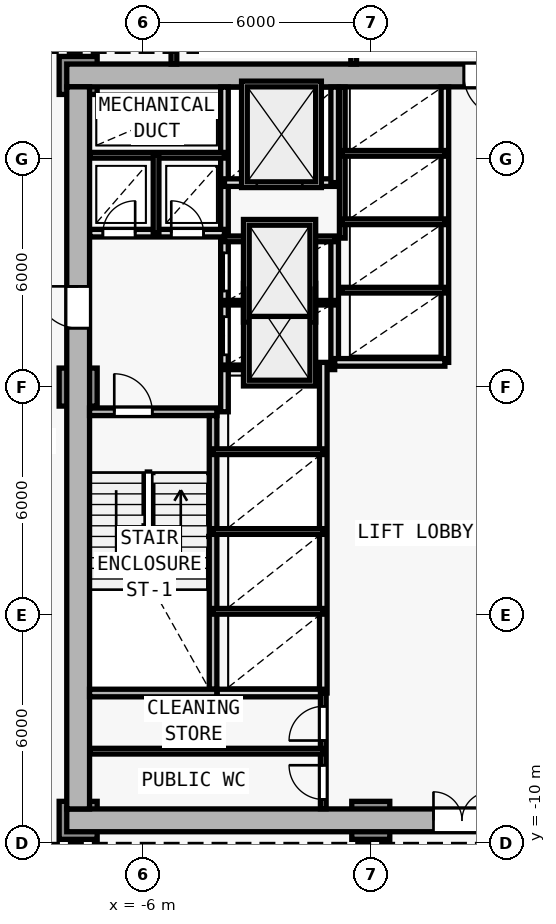
"""IFC4 building model, lengths in metres.
Left out: names, types, materials, properties, quantities, classifications, styles, units other than length and angle.
Written with IfcOpenShell. Run it as: python <this file> out.ifc"""

import sys

from ifc_helpers import new_model, si_unit, direction, frame, frame_2d, origin, origin_2d, place, context, subcontext, project, spatial, rectangle, extrude, element, fill, save


model = new_model("IFC4")
c1 = context("Model", 3, precision=1e-05, world=origin(), true_north=direction((0.0, 1.0)))
c2 = subcontext(c1, "Body", "Model", "MODEL_VIEW")
j1 = project(units=[si_unit("LENGTHUNIT", "METRE"), si_unit("PLANEANGLEUNIT", "RADIAN")], contexts=[c1])
p1 = place(None, origin())
s1 = spatial("IfcSite", under=j1, at=p1, CompositionType="ELEMENT")
p2 = place(p1, origin())
s2 = spatial("IfcBuilding", under=s1, at=p2, CompositionType="ELEMENT")
p3 = place(p2, frame((0.0, 0.0, 9.2)))
s3 = spatial("IfcBuildingStorey", under=s2, at=p3, CompositionType="ELEMENT", Elevation=9.2)
for number, where, z_axis, x_axis in (
    (1, (-7.7, -9.4, 0.0), (0.0, 0.0, 1.0), (1.0, 0.0, 0.0)),
    (2, (-7.7, 10.2, 0.0), (0.0, 0.0, 1.0), (1.0, 0.0, 0.0)),
    (3, (0.0, -9.4, 0.0), (0.0, 0.0, 1.0), (1.0, 0.0, 0.0)),
    (4, (-7.7, 2.0, 0.0), (0.0, 0.0, 1.0), (1.0, 0.0, 0.0)),
):
    element("IfcColumn", number, at=place(p3, frame(where, z_axis=z_axis, x_axis=x_axis)), inside=s3, PredefinedType="COLUMN", context=c2, shape_type="SweptSolid", body=[
        extrude(rectangle(XDim=1.0, YDim=1.0, at=origin_2d()), origin(), (0.0, 0.0, 1.0), 4.2),
    ])
p4 = place(p3, frame((-8.0, -9.4, 0.0), z_axis=(0.0, 0.0, 1.0), x_axis=(1.0, 0.0, 0.0)))
e5 = element("IfcWall", 5, at=p4, inside=s3, PredefinedType="SHEAR", context=c2, shape_type="SweptSolid", body=[
    extrude(rectangle(XDim=16.0, YDim=0.6, at=frame_2d((8.0, 0.0))), origin(), (0.0, 0.0, 1.0), 3.92),
])
p5 = place(p4, frame((9.65, 0.0, 0.0)))
e6 = element("IfcOpeningElement", 6, at=p5, cuts=e5, PredefinedType="OPENING", context=c2, shape_type="SweptSolid", body=[
    extrude(rectangle(XDim=1.5, YDim=2.2, at=frame_2d((0.75, 1.1))), frame((0.0, 0.31, 0.0), z_axis=(0.0, -1.0, 0.0), x_axis=(1.0, 0.0, 0.0)), (0.0, 0.0, 1.0), 0.62),
])
p6 = place(p3, frame((8.0, 10.2, 0.0), z_axis=(0.0, 0.0, 1.0), x_axis=(-1.0, 0.0, 0.0)))
e7 = element("IfcWall", 7, at=p6, inside=s3, PredefinedType="SHEAR", context=c2, shape_type="SweptSolid", body=[
    extrude(rectangle(XDim=16.0, YDim=0.6, at=frame_2d((8.0, 0.0))), origin(), (0.0, 0.0, 1.0), 3.92),
])
p7 = place(p6, frame((4.45, 0.0, 0.0)))
e8 = element("IfcOpeningElement", 8, at=p7, cuts=e7, PredefinedType="OPENING", context=c2, shape_type="SweptSolid", body=[
    extrude(rectangle(XDim=1.1, YDim=2.15, at=frame_2d((0.55, 1.075))), frame((0.0, 0.31, 0.0), z_axis=(0.0, -1.0, 0.0), x_axis=(1.0, 0.0, 0.0)), (0.0, 0.0, 1.0), 0.62),
])
p8 = place(p3, frame((-7.7, -9.1, 0.0), z_axis=(0.0, 0.0, 1.0), x_axis=(0.0, 1.0, 0.0)))
e9 = element("IfcWall", 9, at=p8, inside=s3, PredefinedType="SHEAR", context=c2, shape_type="SweptSolid", body=[
    extrude(rectangle(XDim=19.0, YDim=0.6, at=frame_2d((9.5, 0.0))), origin(), (0.0, 0.0, 1.0), 3.92),
])
p9 = place(p8, frame((12.65, 0.0, 0.0)))
e10 = element("IfcOpeningElement", 10, at=p9, cuts=e9, PredefinedType="OPENING", context=c2, shape_type="SweptSolid", body=[
    extrude(rectangle(XDim=1.1, YDim=2.15, at=frame_2d((0.55, 1.075))), frame((0.0, 0.31, 0.0), z_axis=(0.0, -1.0, 0.0), x_axis=(1.0, 0.0, 0.0)), (0.0, 0.0, 1.0), 0.62),
])
p10 = place(p3, frame((-7.4, 1.35, 0.0), z_axis=(0.0, 0.0, 1.0), x_axis=(1.0, 0.0, 0.0)))
e11 = element("IfcWall", 11, at=p10, inside=s3, PredefinedType="SOLIDWALL", context=c2, shape_type="SweptSolid", body=[
    extrude(rectangle(XDim=3.35, YDim=0.2, at=frame_2d((1.675, 0.0))), origin(), (0.0, 0.0, 1.0), 3.92),
])
p11 = place(p10, frame((0.65, 0.0, 0.0)))
e12 = element("IfcOpeningElement", 12, at=p11, cuts=e11, PredefinedType="OPENING", context=c2, shape_type="SweptSolid", body=[
    extrude(rectangle(XDim=1.0, YDim=2.15, at=frame_2d((0.5, 1.075))), frame((0.0, 0.11, 0.0), z_axis=(0.0, -1.0, 0.0), x_axis=(1.0, 0.0, 0.0)), (0.0, 0.0, 1.0), 0.22),
])
p12 = place(p3, frame((-4.15, -5.95, 0.0), z_axis=(0.0, 0.0, 1.0), x_axis=(0.0, 1.0, 0.0)))
e13 = element("IfcWall", 13, at=p12, inside=s3, PredefinedType="SOLIDWALL", context=c2, shape_type="SweptSolid", body=[
    extrude(rectangle(XDim=7.2, YDim=0.2, at=frame_2d((3.6, 0.0))), origin(), (0.0, 0.0, 1.0), 3.92),
])
p13 = place(p3, frame((-3.85, 1.35, 0.0), z_axis=(0.0, 0.0, 1.0), x_axis=(0.0, 1.0, 0.0)))
e14 = element("IfcWall", 14, at=p13, inside=s3, PredefinedType="SOLIDWALL", context=c2, shape_type="SweptSolid", body=[
    extrude(rectangle(XDim=8.545, YDim=0.2, at=frame_2d((4.272, 0.0))), origin(), (0.0, 0.0, 1.0), 3.92),
])
p14 = place(p13, frame((1.5, 0.0, 0.0)))
e15 = element("IfcOpeningElement", 15, at=p14, cuts=e14, PredefinedType="OPENING", context=c2, shape_type="SweptSolid", body=[
    extrude(rectangle(XDim=1.0, YDim=2.15, at=frame_2d((0.5, 1.075))), frame((0.0, 0.11, 0.0), z_axis=(0.0, -1.0, 0.0), x_axis=(1.0, 0.0, 0.0)), (0.0, 0.0, 1.0), 0.22),
])
p15 = place(p13, frame((3.18, 0.0, 0.0)))
e16 = element("IfcOpeningElement", 16, at=p15, cuts=e14, PredefinedType="OPENING", context=c2, shape_type="SweptSolid", body=[
    extrude(rectangle(XDim=1.0, YDim=2.15, at=frame_2d((0.5, 1.075))), frame((0.0, 0.11, 0.0), z_axis=(0.0, -1.0, 0.0), x_axis=(1.0, 0.0, 0.0)), (0.0, 0.0, 1.0), 0.22),
])
p16 = place(p3, frame((-7.395, 6.05, 0.0), z_axis=(0.0, 0.0, 1.0), x_axis=(1.0, 0.0, 0.0)))
e17 = element("IfcWall", 17, at=p16, inside=s3, PredefinedType="SOLIDWALL", context=c2, shape_type="SweptSolid", body=[
    extrude(rectangle(XDim=3.545, YDim=0.2, at=frame_2d((1.772, 0.0))), origin(), (0.0, 0.0, 1.0), 3.92),
])
p17 = place(p16, frame((0.345, 0.0, 0.0)))
e18 = element("IfcOpeningElement", 18, at=p17, cuts=e17, PredefinedType="OPENING", context=c2, shape_type="SweptSolid", body=[
    extrude(rectangle(XDim=0.85, YDim=2.1, at=frame_2d((0.425, 1.05))), frame((0.0, 0.11, 0.0), z_axis=(0.0, -1.0, 0.0), x_axis=(1.0, 0.0, 0.0)), (0.0, 0.0, 1.0), 0.22),
])
p18 = place(p16, frame((2.145, 0.0, 0.0)))
e19 = element("IfcOpeningElement", 19, at=p18, cuts=e17, PredefinedType="OPENING", context=c2, shape_type="SweptSolid", body=[
    extrude(rectangle(XDim=0.85, YDim=2.1, at=frame_2d((0.425, 1.05))), frame((0.0, 0.11, 0.0), z_axis=(0.0, -1.0, 0.0), x_axis=(1.0, 0.0, 0.0)), (0.0, 0.0, 1.0), 0.22),
])
p19 = place(p3, frame((-7.395, 8.1, 0.0), z_axis=(0.0, 0.0, 1.0), x_axis=(1.0, 0.0, 0.0)))
e20 = element("IfcWall", 20, at=p19, inside=s3, PredefinedType="PARTITIONING", context=c2, shape_type="SweptSolid", body=[
    extrude(rectangle(XDim=3.545, YDim=0.15, at=frame_2d((1.772, 0.0))), origin(), (0.0, 0.0, 1.0), 3.92),
])
p20 = place(p3, frame((-5.65, 6.05, 0.0), z_axis=(0.0, 0.0, 1.0), x_axis=(0.0, 1.0, 0.0)))
e21 = element("IfcWall", 21, at=p20, inside=s3, PredefinedType="PARTITIONING", context=c2, shape_type="SweptSolid", body=[
    extrude(rectangle(XDim=2.05, YDim=0.15, at=frame_2d((1.025, 0.0))), origin(), (0.0, 0.0, 1.0), 3.92),
])
p21 = place(p3, frame((-0.95, 2.65, 0.0), z_axis=(0.0, 0.0, 1.0), x_axis=(0.0, 1.0, 0.0)))
e22 = element("IfcWall", 22, at=p21, inside=s3, PredefinedType="SOLIDWALL", context=c2, shape_type="SweptSolid", body=[
    extrude(rectangle(XDim=3.27, YDim=0.2, at=frame_2d((1.635, 0.0))), origin(), (0.0, 0.0, 1.0), 3.92),
])
for number, where, z_axis, x_axis in (
    (23, (-3.85, 2.52, 0.0), (0.0, 0.0, 1.0), (1.0, 0.0, 0.0)),
    (24, (-3.85, 4.22, 0.0), (0.0, 0.0, 1.0), (1.0, 0.0, 0.0)),
):
    element("IfcWall", number, at=place(p3, frame(where, z_axis=z_axis, x_axis=x_axis)), inside=s3, PredefinedType="PARTITIONING", context=c2, shape_type="SweptSolid", body=[
        extrude(rectangle(XDim=2.9, YDim=0.12, at=frame_2d((1.45, 0.0))), origin(), (0.0, 0.0, 1.0), 3.92),
    ])
p22 = place(p3, frame((-3.85, 5.9, 0.0), z_axis=(0.0, 0.0, 1.0), x_axis=(1.0, 0.0, 0.0)))
e25 = element("IfcWall", 25, at=p22, inside=s3, PredefinedType="PARTITIONING", context=c2, shape_type="SweptSolid", body=[
    extrude(rectangle(XDim=2.9, YDim=0.15, at=frame_2d((1.45, 0.0))), origin(), (0.0, 0.0, 1.0), 3.92),
])
p23 = place(p3, frame((-3.85, 7.38, 0.0), z_axis=(0.0, 0.0, 1.0), x_axis=(1.0, 0.0, 0.0)))
e26 = element("IfcWall", 26, at=p23, inside=s3, PredefinedType="SOLIDWALL", context=c2, shape_type="SweptSolid", body=[
    extrude(rectangle(XDim=2.9, YDim=0.2, at=frame_2d((1.45, 0.0))), origin(), (0.0, 0.0, 1.0), 3.92),
])
p24 = place(p23, frame((0.85, 0.0, 0.0)))
e27 = element("IfcOpeningElement", 27, at=p24, cuts=e26, PredefinedType="OPENING", context=c2, shape_type="SweptSolid", body=[
    extrude(rectangle(XDim=1.2, YDim=2.2, at=frame_2d((0.6, 1.1))), frame((0.0, 0.11, 0.0), z_axis=(0.0, -1.0, 0.0), x_axis=(1.0, 0.0, 0.0)), (0.0, 0.0, 1.0), 0.22),
])
p25 = place(p3, frame((-0.95, 7.38, 0.0), z_axis=(0.0, 0.0, 1.0), x_axis=(0.0, 1.0, 0.0)))
e28 = element("IfcWall", 28, at=p25, inside=s3, PredefinedType="SOLIDWALL", context=c2, shape_type="SweptSolid", body=[
    extrude(rectangle(XDim=2.515, YDim=0.2, at=frame_2d((1.258, 0.0))), origin(), (0.0, 0.0, 1.0), 3.92),
])
p26 = place(p3, frame((-1.25, -6.05, 0.0), z_axis=(0.0, 0.0, 1.0), x_axis=(0.0, 1.0, 0.0)))
e29 = element("IfcWall", 29, at=p26, inside=s3, PredefinedType="SOLIDWALL", context=c2, shape_type="SweptSolid", body=[
    extrude(rectangle(XDim=8.7, YDim=0.2, at=frame_2d((4.35, 0.0))), origin(), (0.0, 0.0, 1.0), 3.92),
])
for number, where, z_axis, x_axis in (
    (30, (-4.15, -3.9, 0.0), (0.0, 0.0, 1.0), (1.0, 0.0, 0.0)),
    (31, (-4.15, -1.8, 0.0), (0.0, 0.0, 1.0), (1.0, 0.0, 0.0)),
    (32, (-4.15, 0.3, 0.0), (0.0, 0.0, 1.0), (1.0, 0.0, 0.0)),
):
    element("IfcWall", number, at=place(p3, frame(where, z_axis=z_axis, x_axis=x_axis)), inside=s3, PredefinedType="PARTITIONING", context=c2, shape_type="SweptSolid", body=[
        extrude(rectangle(XDim=2.9, YDim=0.15, at=frame_2d((1.45, 0.0))), origin(), (0.0, 0.0, 1.0), 3.92),
    ])
p27 = place(p3, frame((1.95, 2.65, 0.0), z_axis=(0.0, 0.0, 1.0), x_axis=(0.0, 1.0, 0.0)))
e33 = element("IfcWall", 33, at=p27, inside=s3, PredefinedType="SOLIDWALL", context=c2, shape_type="SweptSolid", body=[
    extrude(rectangle(XDim=7.245, YDim=0.2, at=frame_2d((3.623, 0.0))), origin(), (0.0, 0.0, 1.0), 3.92),
])
p28 = place(p3, frame((-0.95, 2.65, 0.0), z_axis=(0.0, 0.0, 1.0), x_axis=(1.0, 0.0, 0.0)))
e34 = element("IfcWall", 34, at=p28, inside=s3, PredefinedType="SOLIDWALL", context=c2, shape_type="SweptSolid", body=[
    extrude(rectangle(XDim=2.9, YDim=0.2, at=frame_2d((1.45, 0.0))), origin(), (0.0, 0.0, 1.0), 3.92),
])
p29 = place(p3, frame((-0.75, 5.92, 0.0), z_axis=(0.0, 0.0, 1.0), x_axis=(0.0, 1.0, 0.0)))
e35 = element("IfcWall", 35, at=p29, inside=s3, PredefinedType="PARTITIONING", context=c2, shape_type="SweptSolid", body=[
    extrude(rectangle(XDim=3.975, YDim=0.15, at=frame_2d((1.988, 0.0))), origin(), (0.0, 0.0, 1.0), 3.92),
])
for number, where, z_axis, x_axis in (
    (36, (-0.75, 4.55, 0.0), (0.0, 0.0, 1.0), (1.0, 0.0, 0.0)),
    (37, (-0.75, 6.35, 0.0), (0.0, 0.0, 1.0), (1.0, 0.0, 0.0)),
    (38, (-0.75, 8.15, 0.0), (0.0, 0.0, 1.0), (1.0, 0.0, 0.0)),
):
    element("IfcWall", number, at=place(p3, frame(where, z_axis=z_axis, x_axis=x_axis)), inside=s3, PredefinedType="PARTITIONING", context=c2, shape_type="SweptSolid", body=[
        extrude(rectangle(XDim=2.7, YDim=0.15, at=frame_2d((1.35, 0.0))), origin(), (0.0, 0.0, 1.0), 3.92),
    ])
p30 = place(p3, frame((-7.4, -6.05, 0.0), z_axis=(0.0, 0.0, 1.0), x_axis=(1.0, 0.0, 0.0)))
e39 = element("IfcWall", 39, at=p30, inside=s3, PredefinedType="SOLIDWALL", context=c2, shape_type="SweptSolid", body=[
    extrude(rectangle(XDim=3.35, YDim=0.2, at=frame_2d((1.675, 0.0))), origin(), (0.0, 0.0, 1.0), 3.92),
])
p31 = place(p3, frame((-4.04, -6.05, 0.0), z_axis=(0.0, 0.0, 1.0), x_axis=(1.0, 0.0, 0.0)))
e40 = element("IfcWall", 40, at=p31, inside=s3, PredefinedType="SOLIDWALL", context=c2, shape_type="SweptSolid", body=[
    extrude(rectangle(XDim=2.79, YDim=0.2, at=frame_2d((1.395, 0.0))), origin(), (0.0, 0.0, 1.0), 3.92),
])
p32 = place(p3, frame((-1.25, -9.095, 0.0), z_axis=(0.0, 0.0, 1.0), x_axis=(0.0, 1.0, 0.0)))
e41 = element("IfcWall", 41, at=p32, inside=s3, PredefinedType="PARTITIONING", context=c2, shape_type="SweptSolid", body=[
    extrude(rectangle(XDim=3.045, YDim=0.15, at=frame_2d((1.522, 0.0))), origin(), (0.0, 0.0, 1.0), 3.92),
])
p33 = place(p32, frame((1.795, 0.0, 0.0)))
e42 = element("IfcOpeningElement", 42, at=p33, cuts=e41, PredefinedType="OPENING", context=c2, shape_type="SweptSolid", body=[
    extrude(rectangle(XDim=0.9, YDim=2.1, at=frame_2d((0.45, 1.05))), frame((0.0, 0.085, 0.0), z_axis=(0.0, -1.0, 0.0), x_axis=(1.0, 0.0, 0.0)), (0.0, 0.0, 1.0), 0.17),
])
p34 = place(p32, frame((0.245, 0.0, 0.0)))
e43 = element("IfcOpeningElement", 43, at=p34, cuts=e41, PredefinedType="OPENING", context=c2, shape_type="SweptSolid", body=[
    extrude(rectangle(XDim=0.9, YDim=2.1, at=frame_2d((0.45, 1.05))), frame((0.0, 0.085, 0.0), z_axis=(0.0, -1.0, 0.0), x_axis=(1.0, 0.0, 0.0)), (0.0, 0.0, 1.0), 0.17),
])
p35 = place(p3, frame((-7.395, -7.58, 0.0), z_axis=(0.0, 0.0, 1.0), x_axis=(1.0, 0.0, 0.0)))
e44 = element("IfcWall", 44, at=p35, inside=s3, PredefinedType="PARTITIONING", context=c2, shape_type="SweptSolid", body=[
    extrude(rectangle(XDim=6.145, YDim=0.15, at=frame_2d((3.073, 0.0))), origin(), (0.0, 0.0, 1.0), 3.92),
])
p36 = place(p3, frame((-5.18, 10.5, 0.0), z_axis=(0.0, 0.0, 1.0), x_axis=(0.0, 1.0, 0.0)))
e45 = element("IfcWall", 45, at=p36, inside=s3, PredefinedType="PARTITIONING", context=c2, shape_type="SweptSolid", body=[
    extrude(rectangle(XDim=7.78, YDim=0.15, at=frame_2d((3.89, 0.0))), origin(), (0.0, 0.0, 1.0), 3.92),
])
p37 = place(p36, frame((1.849, 0.0, 0.0)))
e46 = element("IfcOpeningElement", 46, at=p37, cuts=e45, PredefinedType="OPENING", context=c2, shape_type="SweptSolid", body=[
    extrude(rectangle(XDim=0.9, YDim=2.1, at=frame_2d((0.45, 1.05))), frame((0.0, 0.085, 0.0), z_axis=(0.0, -1.0, 0.0), x_axis=(1.0, 0.0, 0.0)), (0.0, 0.0, 1.0), 0.17),
])
p38 = place(p3, frame((-0.45, 10.5, 0.0), z_axis=(0.0, 0.0, 1.0), x_axis=(0.0, 1.0, 0.0)))
e47 = element("IfcWall", 47, at=p38, inside=s3, PredefinedType="PARTITIONING", context=c2, shape_type="SweptSolid", body=[
    extrude(rectangle(XDim=4.75, YDim=0.15, at=frame_2d((2.375, 0.0))), origin(), (0.0, 0.0, 1.0), 3.92),
])
p39 = place(p5, origin())
e48 = element("IfcDoor", 48, at=p39, inside=s3, OperationType="DOUBLE_DOOR_SINGLE_SWING", PredefinedType="DOOR", context=c2, shape_type="SweptSolid", body=[
    extrude(rectangle(XDim=1.5, YDim=2.2, at=frame_2d((0.75, 1.1))), frame((0.0, 0.025, 0.0), z_axis=(0.0, -1.0, 0.0), x_axis=(1.0, 0.0, 0.0)), (0.0, 0.0, 1.0), 0.05),
])
fill(e6, e48)
p40 = place(p9, origin())
e49 = element("IfcDoor", 49, at=p40, inside=s3, OperationType="SINGLE_SWING_RIGHT", PredefinedType="DOOR", context=c2, shape_type="SweptSolid", body=[
    extrude(rectangle(XDim=1.1, YDim=2.15, at=frame_2d((0.55, 1.075))), frame((0.0, 0.025, 0.0), z_axis=(0.0, -1.0, 0.0), x_axis=(1.0, 0.0, 0.0)), (0.0, 0.0, 1.0), 0.05),
])
fill(e10, e49)
p41 = place(p7, origin())
e50 = element("IfcDoor", 50, at=p41, inside=s3, OperationType="SINGLE_SWING_LEFT", PredefinedType="DOOR", context=c2, shape_type="SweptSolid", body=[
    extrude(rectangle(XDim=1.1, YDim=2.15, at=frame_2d((0.55, 1.075))), frame((0.0, 0.025, 0.0), z_axis=(0.0, -1.0, 0.0), x_axis=(1.0, 0.0, 0.0)), (0.0, 0.0, 1.0), 0.05),
])
fill(e8, e50)
p42 = place(p11, origin())
e51 = element("IfcDoor", 51, at=p42, inside=s3, OperationType="SINGLE_SWING_LEFT", PredefinedType="DOOR", context=c2, shape_type="SweptSolid", body=[
    extrude(rectangle(XDim=1.0, YDim=2.15, at=frame_2d((0.5, 1.075))), frame((0.0, 0.025, 0.0), z_axis=(0.0, -1.0, 0.0), x_axis=(1.0, 0.0, 0.0)), (0.0, 0.0, 1.0), 0.05),
])
fill(e12, e51)
p43 = place(p17, origin())
e52 = element("IfcDoor", 52, at=p43, inside=s3, OperationType="SINGLE_SWING_RIGHT", PredefinedType="DOOR", context=c2, shape_type="SweptSolid", body=[
    extrude(rectangle(XDim=0.85, YDim=2.1, at=frame_2d((0.425, 1.05))), frame((0.0, 0.025, 0.0), z_axis=(0.0, -1.0, 0.0), x_axis=(1.0, 0.0, 0.0)), (0.0, 0.0, 1.0), 0.05),
])
fill(e18, e52)
p44 = place(p18, origin())
e53 = element("IfcDoor", 53, at=p44, inside=s3, OperationType="SINGLE_SWING_LEFT", PredefinedType="DOOR", context=c2, shape_type="SweptSolid", body=[
    extrude(rectangle(XDim=0.85, YDim=2.1, at=frame_2d((0.425, 1.05))), frame((0.0, 0.025, 0.0), z_axis=(0.0, -1.0, 0.0), x_axis=(1.0, 0.0, 0.0)), (0.0, 0.0, 1.0), 0.05),
])
fill(e19, e53)
p45 = place(p24, origin())
e54 = element("IfcDoor", 54, at=p45, inside=s3, OperationType="DOUBLE_DOOR_SLIDING", PredefinedType="DOOR", context=c2, shape_type="SweptSolid", body=[
    extrude(rectangle(XDim=1.2, YDim=2.2, at=frame_2d((0.6, 1.1))), frame((0.0, 0.025, 0.0), z_axis=(0.0, -1.0, 0.0), x_axis=(1.0, 0.0, 0.0)), (0.0, 0.0, 1.0), 0.05),
])
fill(e27, e54)
p46 = place(p14, origin())
e55 = element("IfcDoor", 55, at=p46, inside=s3, OperationType="DOUBLE_DOOR_SLIDING", PredefinedType="DOOR", context=c2, shape_type="SweptSolid", body=[
    extrude(rectangle(XDim=1.0, YDim=2.15, at=frame_2d((0.5, 1.075))), frame((0.0, 0.025, 0.0), z_axis=(0.0, -1.0, 0.0), x_axis=(1.0, 0.0, 0.0)), (0.0, 0.0, 1.0), 0.05),
])
fill(e15, e55)
p47 = place(p15, origin())
e56 = element("IfcDoor", 56, at=p47, inside=s3, OperationType="DOUBLE_DOOR_SLIDING", PredefinedType="DOOR", context=c2, shape_type="SweptSolid", body=[
    extrude(rectangle(XDim=1.0, YDim=2.15, at=frame_2d((0.5, 1.075))), frame((0.0, 0.025, 0.0), z_axis=(0.0, -1.0, 0.0), x_axis=(1.0, 0.0, 0.0)), (0.0, 0.0, 1.0), 0.05),
])
fill(e16, e56)
p48 = place(p33, origin())
e57 = element("IfcDoor", 57, at=p48, inside=s3, OperationType="SINGLE_SWING_LEFT", PredefinedType="DOOR", context=c2, shape_type="SweptSolid", body=[
    extrude(rectangle(XDim=0.9, YDim=2.1, at=frame_2d((0.45, 1.05))), frame((0.0, 0.025, 0.0), z_axis=(0.0, -1.0, 0.0), x_axis=(1.0, 0.0, 0.0)), (0.0, 0.0, 1.0), 0.05),
])
fill(e42, e57)
p49 = place(p34, origin())
e58 = element("IfcDoor", 58, at=p49, inside=s3, OperationType="SINGLE_SWING_RIGHT", PredefinedType="DOOR", context=c2, shape_type="SweptSolid", body=[
    extrude(rectangle(XDim=0.9, YDim=2.1, at=frame_2d((0.45, 1.05))), frame((0.0, 0.025, 0.0), z_axis=(0.0, -1.0, 0.0), x_axis=(1.0, 0.0, 0.0)), (0.0, 0.0, 1.0), 0.05),
])
fill(e43, e58)
save(model, sys.argv[1])
